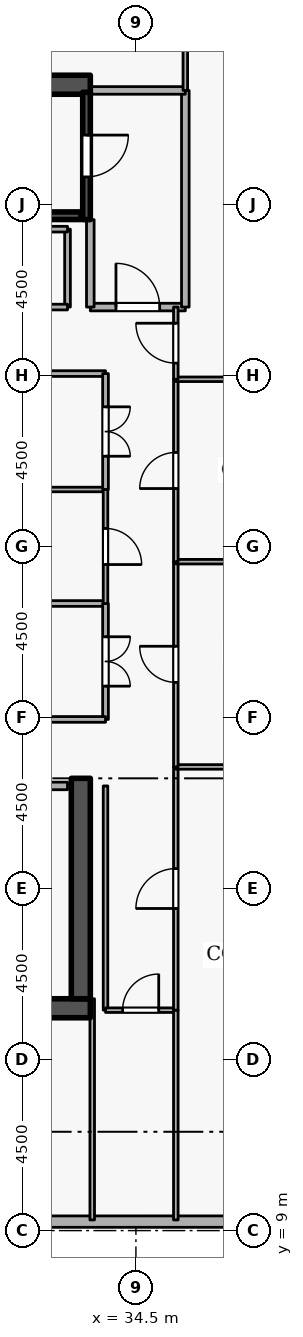
"""IFC4 building model, lengths in metres.
Left out: names, types, materials, properties, quantities, classifications, styles, units other than length and angle.
Written with IfcOpenShell. Run it as: python <this file> out.ifc"""

import sys

from ifc_helpers import new_model, si_unit, direction, frame, frame_2d, origin, place, context, subcontext, project, spatial, rectangle, extrude, element, fill, save


model = new_model("IFC4")
c1 = context("Model", 3, precision=1e-05, world=origin(), true_north=direction((0.0, 1.0)))
c2 = subcontext(c1, "Body", "Model", "MODEL_VIEW")
j1 = project(units=[si_unit("LENGTHUNIT", "METRE"), si_unit("PLANEANGLEUNIT", "RADIAN")], contexts=[c1])
p1 = place(None, origin())
s1 = spatial("IfcSite", under=j1, at=p1, CompositionType="ELEMENT")
p2 = place(p1, origin())
s2 = spatial("IfcBuilding", under=s1, at=p2, CompositionType="ELEMENT")
p3 = place(p2, frame((0.0, 0.0, 218.1)))
s3 = spatial("IfcBuildingStorey", under=s2, at=p3, CompositionType="ELEMENT", Elevation=218.1)
p4 = place(p3, frame((17.7, 14.85, 0.0), z_axis=(0.0, 0.0, 1.0), x_axis=(1.0, 0.0, 0.0)))
e1 = element("IfcWall", 1, at=p4, inside=s3, PredefinedType="SHEAR", context=c2, shape_type="SweptSolid", body=[
    extrude(rectangle(XDim=15.6, YDim=0.5, at=frame_2d((7.8, 0.0))), origin(), (0.0, 0.0, 1.0), 3.6),
])
p5 = place(p3, frame((33.05, 15.1, 0.0), z_axis=(0.0, 0.0, 1.0), x_axis=(0.0, 1.0, 0.0)))
e2 = element("IfcWall", 2, at=p5, inside=s3, PredefinedType="SHEAR", context=c2, shape_type="SweptSolid", body=[
    extrude(rectangle(XDim=5.8, YDim=0.5, at=frame_2d((2.9, 0.0))), origin(), (0.0, 0.0, 1.0), 3.6),
])
p6 = place(p3, frame((17.7, 39.15, 0.0), z_axis=(0.0, 0.0, 1.0), x_axis=(1.0, 0.0, 0.0)))
e3 = element("IfcWall", 3, at=p6, inside=s3, PredefinedType="SHEAR", context=c2, shape_type="SweptSolid", body=[
    extrude(rectangle(XDim=15.6, YDim=0.5, at=frame_2d((7.8, 0.0))), origin(), (0.0, 0.0, 1.0), 3.6),
])
p7 = place(p3, frame((4.319, 9.235, 0.0), z_axis=(0.0, 0.0, 1.0), x_axis=(0.999999999634, 2.7061402e-05, 0.0)))
e4 = element("IfcWall", 4, at=p7, inside=s3, PredefinedType="STANDARD", context=c2, shape_type="SweptSolid", body=[
    extrude(rectangle(XDim=36.087, YDim=0.3, at=frame_2d((18.043, 0.0))), origin(), (0.0, 0.0, 1.0), 2.66),
])
p8 = place(p7, frame((1.8, 0.0, 0.72)))
e5 = element("IfcOpeningElement", 5, at=p8, cuts=e4, PredefinedType="OPENING", context=c2, shape_type="SweptSolid", body=[
    extrude(rectangle(XDim=1.35, YDim=1.05, at=frame_2d((0.675, 0.525))), frame((0.0, 0.16, 0.0), z_axis=(0.0, -1.0, 0.0), x_axis=(1.0, 0.0, 0.0)), (0.0, 0.0, 1.0), 0.32),
])
p9 = place(p7, frame((11.4, 0.0, 0.72)))
e6 = element("IfcOpeningElement", 6, at=p9, cuts=e4, PredefinedType="OPENING", context=c2, shape_type="SweptSolid", body=[
    extrude(rectangle(XDim=1.35, YDim=1.05, at=frame_2d((0.675, 0.525))), frame((0.0, 0.16, 0.0), z_axis=(0.0, -1.0, 0.0), x_axis=(1.0, 0.0, 0.0)), (0.0, 0.0, 1.0), 0.32),
])
p10 = place(p7, frame((16.2, 0.0, 0.72)))
e7 = element("IfcOpeningElement", 7, at=p10, cuts=e4, PredefinedType="OPENING", context=c2, shape_type="SweptSolid", body=[
    extrude(rectangle(XDim=1.35, YDim=1.05, at=frame_2d((0.675, 0.525))), frame((0.0, 0.16, 0.0), z_axis=(0.0, -1.0, 0.0), x_axis=(1.0, 0.0, 0.0)), (0.0, 0.0, 1.0), 0.32),
])
p11 = place(p7, frame((25.8, 0.0, 0.72)))
e8 = element("IfcOpeningElement", 8, at=p11, cuts=e4, PredefinedType="OPENING", context=c2, shape_type="SweptSolid", body=[
    extrude(rectangle(XDim=1.35, YDim=1.05, at=frame_2d((0.675, 0.525))), frame((0.0, 0.16, 0.0), z_axis=(0.0, -1.0, 0.0), x_axis=(1.0, 0.0, 0.0)), (0.0, 0.0, 1.0), 0.32),
])
p12 = place(p3, frame((33.2, 38.95, 0.0), z_axis=(0.0, 0.0, 1.0), x_axis=(0.0, -1.0, 0.0)))
e9 = element("IfcWall", 9, at=p12, inside=s3, PredefinedType="SHEAR", context=c2, shape_type="SweptSolid", body=[
    extrude(rectangle(XDim=3.35, YDim=0.2, at=frame_2d((1.675, 0.0))), origin(), (0.0, 0.0, 1.0), 3.6),
])
p13 = place(p12, frame((1.125, 0.0, 0.0)))
e10 = element("IfcOpeningElement", 10, at=p13, cuts=e9, PredefinedType="OPENING", context=c2, shape_type="SweptSolid", body=[
    extrude(rectangle(XDim=1.1, YDim=2.1, at=frame_2d((0.55, 1.05))), frame((0.0, 0.11, 0.0), z_axis=(0.0, -1.0, 0.0), x_axis=(1.0, 0.0, 0.0)), (0.0, 0.0, 1.0), 0.22),
])
p14 = place(p3, frame((25.95, 35.703, 0.0), z_axis=(0.0, 0.0, 1.0), x_axis=(1.0, 0.0, 0.0)))
e11 = element("IfcWall", 11, at=p14, inside=s3, PredefinedType="SHEAR", context=c2, shape_type="SweptSolid", body=[
    extrude(rectangle(XDim=7.1, YDim=0.2, at=frame_2d((3.55, 0.0))), origin(), (0.0, 0.0, 1.0), 3.6),
])
p15 = place(p3, frame((33.3, 33.3, 0.0), z_axis=(0.0, 0.0, 1.0), x_axis=(1.0, 0.0, 0.0)))
e12 = element("IfcWall", 12, at=p15, inside=s3, PredefinedType="STANDARD", context=c2, shape_type="SweptSolid", body=[
    extrude(rectangle(XDim=2.5, YDim=0.2, at=frame_2d((1.25, 0.0))), origin(), (0.0, 0.0, 1.0), 3.26),
])
p16 = place(p15, frame((0.675, 0.0, 0.0)))
e13 = element("IfcOpeningElement", 13, at=p16, cuts=e12, PredefinedType="OPENING", context=c2, shape_type="SweptSolid", body=[
    extrude(rectangle(XDim=1.15, YDim=2.1, at=frame_2d((0.575, 1.05))), frame((0.0, 0.11, 0.0), z_axis=(0.0, -1.0, 0.0), x_axis=(1.0, 0.0, 0.0)), (0.0, 0.0, 1.0), 0.22),
])
p17 = place(p3, frame((35.8, 33.3, 0.0), z_axis=(0.0, 0.0, 1.0), x_axis=(0.0, 1.0, 0.0)))
e14 = element("IfcWall", 14, at=p17, inside=s3, PredefinedType="STANDARD", context=c2, shape_type="SweptSolid", body=[
    extrude(rectangle(XDim=5.7, YDim=0.2, at=frame_2d((2.85, 0.0))), origin(), (0.0, 0.0, 1.0), 3.26),
])
p18 = place(p3, frame((35.8, 39.0, 0.0), z_axis=(0.0, 0.0, 1.0), x_axis=(-1.0, 0.0, 0.0)))
e15 = element("IfcWall", 15, at=p18, inside=s3, PredefinedType="STANDARD", context=c2, shape_type="SweptSolid", body=[
    extrude(rectangle(XDim=2.5, YDim=0.2, at=frame_2d((1.25, 0.0))), origin(), (0.0, 0.0, 1.0), 3.26),
])
p19 = place(p3, frame((33.3, 35.6, 0.0), z_axis=(0.0, 0.0, 1.0), x_axis=(0.0, -1.0, 0.0)))
e16 = element("IfcWall", 16, at=p19, inside=s3, PredefinedType="STANDARD", context=c2, shape_type="SweptSolid", body=[
    extrude(rectangle(XDim=2.3, YDim=0.2, at=frame_2d((1.15, 0.0))), origin(), (0.0, 0.0, 1.0), 2.465),
])
p20 = place(p3, frame((30.5, 20.7, 0.0), z_axis=(0.0, 0.0, 1.0), x_axis=(1.0, 0.0, 0.0)))
e17 = element("IfcWall", 17, at=p20, inside=s3, PredefinedType="STANDARD", context=c2, shape_type="SweptSolid", body=[
    extrude(rectangle(XDim=2.2, YDim=0.2, at=frame_2d((1.1, 0.0))), origin(), (0.0, 0.0, 1.0), 3.26),
])
p21 = place(p20, frame((0.525, 0.0, 0.0)))
e18 = element("IfcOpeningElement", 18, at=p21, cuts=e17, PredefinedType="OPENING", context=c2, shape_type="SweptSolid", body=[
    extrude(rectangle(XDim=1.15, YDim=2.1, at=frame_2d((0.575, 1.05))), frame((0.0, 0.11, 0.0), z_axis=(0.0, -1.0, 0.0), x_axis=(1.0, 0.0, 0.0)), (0.0, 0.0, 1.0), 0.22),
])
p22 = place(p3, frame((32.7, 35.35, 0.0), z_axis=(0.0, 0.0, 1.0), x_axis=(0.0, -1.0, 0.0)))
e19 = element("IfcWall", 19, at=p22, inside=s3, PredefinedType="PARTITIONING", context=c2, shape_type="SweptSolid", body=[
    extrude(rectangle(XDim=2.05, YDim=0.15, at=frame_2d((1.025, 0.0))), origin(), (0.0, 0.0, 1.0), 2.465),
])
p23 = place(p3, frame((32.7, 33.3, 0.0), z_axis=(0.0, 0.0, 1.0), x_axis=(-1.0, 0.0, 0.0)))
e20 = element("IfcWall", 20, at=p23, inside=s3, PredefinedType="PARTITIONING", context=c2, shape_type="SweptSolid", body=[
    extrude(rectangle(XDim=2.35, YDim=0.15, at=frame_2d((1.175, 0.0))), origin(), (0.0, 0.0, 1.0), 3.26),
])
p24 = place(p23, frame((0.715, 0.0, 0.0)))
e21 = element("IfcOpeningElement", 21, at=p24, cuts=e20, PredefinedType="OPENING", context=c2, shape_type="SweptSolid", body=[
    extrude(rectangle(XDim=0.92, YDim=2.08, at=frame_2d((0.46, 1.04))), frame((0.0, 0.085, 0.0), z_axis=(0.0, -1.0, 0.0), x_axis=(1.0, 0.0, 0.0)), (0.0, 0.0, 1.0), 0.17),
])
p25 = place(p3, frame((30.35, 35.35, 0.0), z_axis=(0.0, 0.0, 1.0), x_axis=(1.0, 0.0, 0.0)))
e22 = element("IfcWall", 22, at=p25, inside=s3, PredefinedType="PARTITIONING", context=c2, shape_type="SweptSolid", body=[
    extrude(rectangle(XDim=2.35, YDim=0.15, at=frame_2d((1.175, 0.0))), origin(), (0.0, 0.0, 1.0), 3.26),
])
p26 = place(p3, frame((33.7, 20.7, 0.0), z_axis=(0.0, 0.0, 1.0), x_axis=(0.0, -1.0, 0.0)))
e23 = element("IfcWall", 23, at=p26, inside=s3, PredefinedType="PARTITIONING", context=c2, shape_type="SweptSolid", body=[
    extrude(rectangle(XDim=5.9, YDim=0.12, at=frame_2d((2.95, 0.0))), origin(), (0.0, 0.0, 1.0), 3.26),
])
p27 = place(p3, frame((33.7, 14.8, 0.0), z_axis=(0.0, 0.0, 1.0), x_axis=(1.0, 0.0, 0.0)))
e24 = element("IfcWall", 24, at=p27, inside=s3, PredefinedType="PARTITIONING", context=c2, shape_type="SweptSolid", body=[
    extrude(rectangle(XDim=1.85, YDim=0.12, at=frame_2d((0.925, 0.0))), origin(), (0.0, 0.0, 1.0), 3.26),
])
p28 = place(p27, frame((0.45, 0.0, 0.0)))
e25 = element("IfcOpeningElement", 25, at=p28, cuts=e24, PredefinedType="OPENING", context=c2, shape_type="SweptSolid", body=[
    extrude(rectangle(XDim=0.95, YDim=2.1, at=frame_2d((0.475, 1.05))), frame((0.0, 0.07, 0.0), z_axis=(0.0, -1.0, 0.0), x_axis=(1.0, 0.0, 0.0)), (0.0, 0.0, 1.0), 0.14),
])
p29 = place(p3, frame((35.55, 14.8, 0.0), z_axis=(0.0, 0.0, 1.0), x_axis=(0.0, -1.0, 0.0)))
e26 = element("IfcWall", 26, at=p29, inside=s3, PredefinedType="PARTITIONING", context=c2, shape_type="SweptSolid", body=[
    extrude(rectangle(XDim=5.52, YDim=0.12, at=frame_2d((2.76, 0.0))), origin(), (0.0, 0.0, 1.0), 3.26),
])
p30 = place(p3, frame((33.35, 9.28, 0.0), z_axis=(0.0, 0.0, 1.0), x_axis=(0.0, 1.0, 0.0)))
e27 = element("IfcWall", 27, at=p30, inside=s3, PredefinedType="PARTITIONING", context=c2, shape_type="SweptSolid", body=[
    extrude(rectangle(XDim=5.82, YDim=0.12, at=frame_2d((2.91, 0.0))), origin(), (0.0, 0.0, 1.0), 2.465),
])
p31 = place(p3, frame((35.55, 14.8, 0.0), z_axis=(0.0, 0.0, 1.0), x_axis=(0.0, 1.0, 0.0)))
e28 = element("IfcWall", 28, at=p31, inside=s3, PredefinedType="PARTITIONING", context=c2, shape_type="SweptSolid", body=[
    extrude(rectangle(XDim=6.4, YDim=0.12, at=frame_2d((3.2, 0.0))), origin(), (0.0, 0.0, 1.0), 3.26),
])
p32 = place(p31, frame((2.675, 0.0, 0.0)))
e29 = element("IfcOpeningElement", 29, at=p32, cuts=e28, PredefinedType="OPENING", context=c2, shape_type="SweptSolid", body=[
    extrude(rectangle(XDim=1.05, YDim=2.1, at=frame_2d((0.525, 1.05))), frame((0.0, 0.07, 0.0), z_axis=(0.0, -1.0, 0.0), x_axis=(1.0, 0.0, 0.0)), (0.0, 0.0, 1.0), 0.14),
])
p33 = place(p3, frame((35.55, 21.2, 0.0), z_axis=(0.0, 0.0, 1.0), x_axis=(1.0, 0.0, 0.0)))
e30 = element("IfcWall", 30, at=p33, inside=s3, PredefinedType="PARTITIONING", context=c2, shape_type="SweptSolid", body=[
    extrude(rectangle(XDim=7.67, YDim=0.12, at=frame_2d((3.835, 0.0))), origin(), (0.0, 0.0, 1.0), 3.26),
])
p34 = place(p3, frame((35.55, 21.2, 0.0), z_axis=(0.0, 0.0, 1.0), x_axis=(0.0, 1.0, 0.0)))
e31 = element("IfcWall", 31, at=p34, inside=s3, PredefinedType="PARTITIONING", context=c2, shape_type="SweptSolid", body=[
    extrude(rectangle(XDim=5.4, YDim=0.12, at=frame_2d((2.7, 0.0))), origin(), (0.0, 0.0, 1.0), 3.26),
])
p35 = place(p34, frame((2.225, 0.0, 0.0)))
e32 = element("IfcOpeningElement", 32, at=p35, cuts=e31, PredefinedType="OPENING", context=c2, shape_type="SweptSolid", body=[
    extrude(rectangle(XDim=0.95, YDim=2.1, at=frame_2d((0.475, 1.05))), frame((0.0, 0.07, 0.0), z_axis=(0.0, -1.0, 0.0), x_axis=(1.0, 0.0, 0.0)), (0.0, 0.0, 1.0), 0.14),
])
p36 = place(p3, frame((35.55, 26.6, 0.0), z_axis=(0.0, 0.0, 1.0), x_axis=(1.0, 0.0, 0.0)))
e33 = element("IfcWall", 33, at=p36, inside=s3, PredefinedType="PARTITIONING", context=c2, shape_type="SweptSolid", body=[
    extrude(rectangle(XDim=7.67, YDim=0.12, at=frame_2d((3.835, 0.0))), origin(), (0.0, 0.0, 1.0), 3.26),
])
p37 = place(p3, frame((35.55, 26.6, 0.0), z_axis=(0.0, 0.0, 1.0), x_axis=(0.0, 1.0, 0.0)))
e34 = element("IfcWall", 34, at=p37, inside=s3, PredefinedType="PARTITIONING", context=c2, shape_type="SweptSolid", body=[
    extrude(rectangle(XDim=4.8, YDim=0.12, at=frame_2d((2.4, 0.0))), origin(), (0.0, 0.0, 1.0), 3.26),
])
p38 = place(p37, frame((1.925, 0.0, 0.0)))
e35 = element("IfcOpeningElement", 35, at=p38, cuts=e34, PredefinedType="OPENING", context=c2, shape_type="SweptSolid", body=[
    extrude(rectangle(XDim=0.95, YDim=2.1, at=frame_2d((0.475, 1.05))), frame((0.0, 0.07, 0.0), z_axis=(0.0, -1.0, 0.0), x_axis=(1.0, 0.0, 0.0)), (0.0, 0.0, 1.0), 0.14),
])
p39 = place(p3, frame((35.55, 31.4, 0.0), z_axis=(0.0, 0.0, 1.0), x_axis=(1.0, 0.0, 0.0)))
e36 = element("IfcWall", 36, at=p39, inside=s3, PredefinedType="PARTITIONING", context=c2, shape_type="SweptSolid", body=[
    extrude(rectangle(XDim=7.67, YDim=0.12, at=frame_2d((3.835, 0.0))), origin(), (0.0, 0.0, 1.0), 3.26),
])
p40 = place(p3, frame((35.8, 39.0, 0.0), z_axis=(0.0, 0.0, 1.0), x_axis=(0.0, 1.0, 0.0)))
e37 = element("IfcWall", 37, at=p40, inside=s3, PredefinedType="PARTITIONING", context=c2, shape_type="SweptSolid", body=[
    extrude(rectangle(XDim=11.72, YDim=0.12, at=frame_2d((5.86, 0.0))), origin(), (0.0, 0.0, 1.0), 3.26),
])
p41 = place(p3, frame((35.55, 31.4, 0.0), z_axis=(0.0, 0.0, 1.0), x_axis=(0.0, 1.0, 0.0)))
e38 = element("IfcWall", 38, at=p41, inside=s3, PredefinedType="PARTITIONING", context=c2, shape_type="SweptSolid", body=[
    extrude(rectangle(XDim=1.9, YDim=0.12, at=frame_2d((0.95, 0.0))), origin(), (0.0, 0.0, 1.0), 3.26),
])
p42 = place(p41, frame((0.425, 0.0, 0.0)))
e39 = element("IfcOpeningElement", 39, at=p42, cuts=e38, PredefinedType="OPENING", context=c2, shape_type="SweptSolid", body=[
    extrude(rectangle(XDim=1.05, YDim=2.1, at=frame_2d((0.525, 1.05))), frame((0.0, 0.07, 0.0), z_axis=(0.0, -1.0, 0.0), x_axis=(1.0, 0.0, 0.0)), (0.0, 0.0, 1.0), 0.14),
])
p43 = place(p3, frame((30.7, 25.5, 0.0), z_axis=(0.0, 0.0, 1.0), x_axis=(1.0, 0.0, 0.0)))
e40 = element("IfcWall", 40, at=p43, inside=s3, PredefinedType="PARTITIONING", context=c2, shape_type="SweptSolid", body=[
    extrude(rectangle(XDim=3.0, YDim=0.15, at=frame_2d((1.5, 0.0))), origin(), (0.0, 0.0, 1.0), 3.26),
])
p44 = place(p3, frame((33.7, 25.5, 0.0), z_axis=(0.0, 0.0, 1.0), x_axis=(0.0, -1.0, 0.0)))
e41 = element("IfcWall", 41, at=p44, inside=s3, PredefinedType="PARTITIONING", context=c2, shape_type="SweptSolid", body=[
    extrude(rectangle(XDim=3.05, YDim=0.15, at=frame_2d((1.525, 0.0))), origin(), (0.0, 0.0, 1.0), 3.26),
])
p45 = place(p44, frame((0.875, 0.0, 0.0)))
e42 = element("IfcOpeningElement", 42, at=p45, cuts=e41, PredefinedType="OPENING", context=c2, shape_type="SweptSolid", body=[
    extrude(rectangle(XDim=1.3, YDim=2.12, at=frame_2d((0.65, 1.06))), frame((0.0, 0.085, 0.0), z_axis=(0.0, -1.0, 0.0), x_axis=(1.0, 0.0, 0.0)), (0.0, 0.0, 1.0), 0.17),
])
p46 = place(p3, frame((33.7, 22.45, 0.0), z_axis=(0.0, 0.0, 1.0), x_axis=(-1.0, 0.0, 0.0)))
e43 = element("IfcWall", 43, at=p46, inside=s3, PredefinedType="PARTITIONING", context=c2, shape_type="SweptSolid", body=[
    extrude(rectangle(XDim=3.0, YDim=0.15, at=frame_2d((1.5, 0.0))), origin(), (0.0, 0.0, 1.0), 3.26),
])
p47 = place(p3, frame((30.7, 28.5, 0.0), z_axis=(0.0, 0.0, 1.0), x_axis=(1.0, 0.0, 0.0)))
e44 = element("IfcWall", 44, at=p47, inside=s3, PredefinedType="PARTITIONING", context=c2, shape_type="SweptSolid", body=[
    extrude(rectangle(XDim=3.0, YDim=0.12, at=frame_2d((1.5, 0.0))), origin(), (0.0, 0.0, 1.0), 3.26),
])
p48 = place(p3, frame((33.7, 28.5, 0.0), z_axis=(0.0, 0.0, 1.0), x_axis=(0.0, -1.0, 0.0)))
e45 = element("IfcWall", 45, at=p48, inside=s3, PredefinedType="PARTITIONING", context=c2, shape_type="SweptSolid", body=[
    extrude(rectangle(XDim=3.0, YDim=0.12, at=frame_2d((1.5, 0.0))), origin(), (0.0, 0.0, 1.0), 3.26),
])
p49 = place(p48, frame((1.025, 0.0, 0.0)))
e46 = element("IfcOpeningElement", 46, at=p49, cuts=e45, PredefinedType="OPENING", context=c2, shape_type="SweptSolid", body=[
    extrude(rectangle(XDim=0.95, YDim=2.1, at=frame_2d((0.475, 1.05))), frame((0.0, 0.07, 0.0), z_axis=(0.0, -1.0, 0.0), x_axis=(1.0, 0.0, 0.0)), (0.0, 0.0, 1.0), 0.14),
])
p50 = place(p3, frame((30.7, 31.55, 0.0), z_axis=(0.0, 0.0, 1.0), x_axis=(1.0, 0.0, 0.0)))
e47 = element("IfcWall", 47, at=p50, inside=s3, PredefinedType="PARTITIONING", context=c2, shape_type="SweptSolid", body=[
    extrude(rectangle(XDim=3.0, YDim=0.15, at=frame_2d((1.5, 0.0))), origin(), (0.0, 0.0, 1.0), 3.26),
])
p51 = place(p3, frame((33.7, 31.55, 0.0), z_axis=(0.0, 0.0, 1.0), x_axis=(0.0, -1.0, 0.0)))
e48 = element("IfcWall", 48, at=p51, inside=s3, PredefinedType="PARTITIONING", context=c2, shape_type="SweptSolid", body=[
    extrude(rectangle(XDim=3.05, YDim=0.15, at=frame_2d((1.525, 0.0))), origin(), (0.0, 0.0, 1.0), 3.26),
])
p52 = place(p51, frame((0.875, 0.0, 0.0)))
e49 = element("IfcOpeningElement", 49, at=p52, cuts=e48, PredefinedType="OPENING", context=c2, shape_type="SweptSolid", body=[
    extrude(rectangle(XDim=1.3, YDim=2.12, at=frame_2d((0.65, 1.06))), frame((0.0, 0.085, 0.0), z_axis=(0.0, -1.0, 0.0), x_axis=(1.0, 0.0, 0.0)), (0.0, 0.0, 1.0), 0.17),
])
p53 = place(p13, origin())
e50 = element("IfcDoor", 50, at=p53, inside=s3, OperationType="SINGLE_SWING_LEFT", PredefinedType="DOOR", context=c2, shape_type="SweptSolid", body=[
    extrude(rectangle(XDim=1.1, YDim=2.1, at=frame_2d((0.55, 1.05))), frame((0.0, 0.025, 0.0), z_axis=(0.0, -1.0, 0.0), x_axis=(1.0, 0.0, 0.0)), (0.0, 0.0, 1.0), 0.05),
])
fill(e10, e50)
p54 = place(p16, origin())
e51 = element("IfcDoor", 51, at=p54, inside=s3, OperationType="SINGLE_SWING_LEFT", PredefinedType="DOOR", context=c2, shape_type="SweptSolid", body=[
    extrude(rectangle(XDim=1.15, YDim=2.1, at=frame_2d((0.575, 1.05))), frame((0.0, 0.025, 0.0), z_axis=(0.0, -1.0, 0.0), x_axis=(1.0, 0.0, 0.0)), (0.0, 0.0, 1.0), 0.05),
])
fill(e13, e51)
p55 = place(p28, origin())
e52 = element("IfcDoor", 52, at=p55, inside=s3, OperationType="SINGLE_SWING_RIGHT", PredefinedType="DOOR", context=c2, shape_type="SweptSolid", body=[
    extrude(rectangle(XDim=0.95, YDim=2.1, at=frame_2d((0.475, 1.05))), frame((0.0, 0.025, 0.0), z_axis=(0.0, -1.0, 0.0), x_axis=(1.0, 0.0, 0.0)), (0.0, 0.0, 1.0), 0.05),
])
fill(e25, e52)
p56 = place(p32, origin())
e53 = element("IfcDoor", 53, at=p56, inside=s3, OperationType="SINGLE_SWING_LEFT", PredefinedType="DOOR", context=c2, shape_type="SweptSolid", body=[
    extrude(rectangle(XDim=1.05, YDim=2.1, at=frame_2d((0.525, 1.05))), frame((0.0, 0.025, 0.0), z_axis=(0.0, -1.0, 0.0), x_axis=(1.0, 0.0, 0.0)), (0.0, 0.0, 1.0), 0.05),
])
fill(e29, e53)
p57 = place(p35, origin())
e54 = element("IfcDoor", 54, at=p57, inside=s3, OperationType="SINGLE_SWING_RIGHT", PredefinedType="DOOR", context=c2, shape_type="SweptSolid", body=[
    extrude(rectangle(XDim=0.95, YDim=2.1, at=frame_2d((0.475, 1.05))), frame((0.0, 0.025, 0.0), z_axis=(0.0, -1.0, 0.0), x_axis=(1.0, 0.0, 0.0)), (0.0, 0.0, 1.0), 0.05),
])
fill(e32, e54)
p58 = place(p38, origin())
e55 = element("IfcDoor", 55, at=p58, inside=s3, OperationType="SINGLE_SWING_LEFT", PredefinedType="DOOR", context=c2, shape_type="SweptSolid", body=[
    extrude(rectangle(XDim=0.95, YDim=2.1, at=frame_2d((0.475, 1.05))), frame((0.0, 0.025, 0.0), z_axis=(0.0, -1.0, 0.0), x_axis=(1.0, 0.0, 0.0)), (0.0, 0.0, 1.0), 0.05),
])
fill(e35, e55)
p59 = place(p42, origin())
e56 = element("IfcDoor", 56, at=p59, inside=s3, OperationType="SINGLE_SWING_RIGHT", PredefinedType="DOOR", context=c2, shape_type="SweptSolid", body=[
    extrude(rectangle(XDim=1.05, YDim=2.1, at=frame_2d((0.525, 1.05))), frame((0.0, 0.025, 0.0), z_axis=(0.0, -1.0, 0.0), x_axis=(1.0, 0.0, 0.0)), (0.0, 0.0, 1.0), 0.05),
])
fill(e39, e56)
p60 = place(p45, origin())
e57 = element("IfcDoor", 57, at=p60, inside=s3, OperationType="DOUBLE_DOOR_SINGLE_SWING", PredefinedType="DOOR", context=c2, shape_type="SweptSolid", body=[
    extrude(rectangle(XDim=1.3, YDim=2.12, at=frame_2d((0.65, 1.06))), frame((0.0, 0.025, 0.0), z_axis=(0.0, -1.0, 0.0), x_axis=(1.0, 0.0, 0.0)), (0.0, 0.0, 1.0), 0.05),
])
fill(e42, e57)
p61 = place(p49, origin())
e58 = element("IfcDoor", 58, at=p61, inside=s3, OperationType="SINGLE_SWING_RIGHT", PredefinedType="DOOR", context=c2, shape_type="SweptSolid", body=[
    extrude(rectangle(XDim=0.95, YDim=2.1, at=frame_2d((0.475, 1.05))), frame((0.0, 0.025, 0.0), z_axis=(0.0, -1.0, 0.0), x_axis=(1.0, 0.0, 0.0)), (0.0, 0.0, 1.0), 0.05),
])
fill(e46, e58)
p62 = place(p52, origin())
e59 = element("IfcDoor", 59, at=p62, inside=s3, OperationType="DOUBLE_DOOR_SINGLE_SWING", PredefinedType="DOOR", context=c2, shape_type="SweptSolid", body=[
    extrude(rectangle(XDim=1.3, YDim=2.12, at=frame_2d((0.65, 1.06))), frame((0.0, 0.025, 0.0), z_axis=(0.0, -1.0, 0.0), x_axis=(1.0, 0.0, 0.0)), (0.0, 0.0, 1.0), 0.05),
])
fill(e49, e59)
save(model, sys.argv[1])
